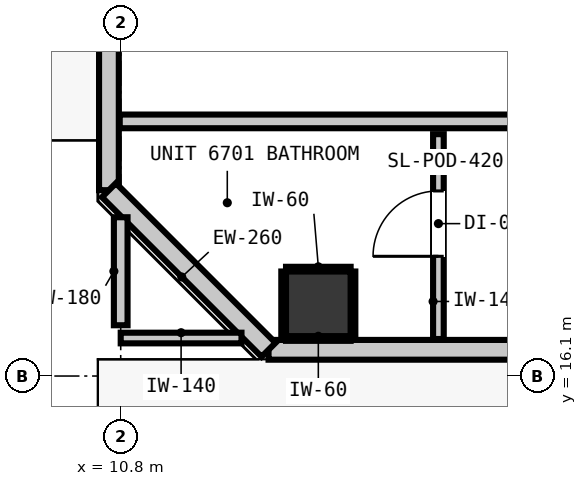
"""IFC4 building model, lengths in metres.
Left out: names, types, materials, properties, quantities, classifications, styles, units other than length and angle.
Written with IfcOpenShell. Run it as: python <this file> out.ifc"""

import sys

from ifc_helpers import new_model, si_unit, direction, frame, frame_2d, origin, origin_2d, place, context, subcontext, project, spatial, rectangle, extrude, element, fill, save


model = new_model("IFC4")
c1 = context("Model", 3, precision=1e-05, world=origin(), true_north=direction((0.0, 1.0)))
c2 = subcontext(c1, "Body", "Model", "MODEL_VIEW")
j1 = project(units=[si_unit("LENGTHUNIT", "METRE"), si_unit("PLANEANGLEUNIT", "RADIAN")], contexts=[c1])
p1 = place(None, origin())
s1 = spatial("IfcSite", under=j1, at=p1, CompositionType="ELEMENT")
p2 = place(p1, origin())
s2 = spatial("IfcBuilding", under=s1, at=p2, CompositionType="ELEMENT")
p3 = place(p2, frame((0.0, 0.0, 231.28)))
s3 = spatial("IfcBuildingStorey", under=s2, at=p3, CompositionType="ELEMENT", Elevation=231.28)
p4 = place(p3, frame((13.4, 17.05, -0.2), z_axis=(0.0, 0.0, 1.0), x_axis=(1.0, 0.0, 0.0)))
e1 = element("IfcColumn", 1, at=p4, inside=s3, PredefinedType="COLUMN", context=c2, shape_type="SweptSolid", body=[
    extrude(rectangle(XDim=0.85, YDim=0.85, at=origin_2d()), origin(), (0.0, 0.0, 1.0), 3.52),
])
p5 = place(p3, frame((10.645, 18.545, 0.0), z_axis=(0.0, 0.0, 1.0), x_axis=(0.0, 1.0, 0.0)))
e2 = element("IfcWall", 2, at=p5, inside=s3, PredefinedType="STANDARD", context=c2, shape_type="SweptSolid", body=[
    extrude(rectangle(XDim=30.31, YDim=0.26, at=frame_2d((15.155, 0.0))), origin(), (0.0, 0.0, 1.0), 3.1),
])
p6 = place(p5, frame((27.695, 0.0, 0.0)))
e3 = element("IfcOpeningElement", 3, at=p6, cuts=e2, PredefinedType="OPENING", context=c2, shape_type="SweptSolid", body=[
    extrude(rectangle(XDim=1.0, YDim=2.15, at=frame_2d((0.5, 1.075))), frame((0.0, 0.14, 0.0), z_axis=(0.0, -1.0, 0.0), x_axis=(1.0, 0.0, 0.0)), (0.0, 0.0, 1.0), 0.28),
])
p7 = place(p5, frame((29.108, 0.0, 0.85)))
e4 = element("IfcOpeningElement", 4, at=p7, cuts=e2, PredefinedType="OPENING", context=c2, shape_type="SweptSolid", body=[
    extrude(rectangle(XDim=0.9, YDim=1.5, at=frame_2d((0.45, 0.75))), frame((0.0, 0.14, 0.0), z_axis=(0.0, -1.0, 0.0), x_axis=(1.0, 0.0, 0.0)), (0.0, 0.0, 1.0), 0.28),
])
p8 = place(p3, frame((45.455, 16.445, 0.0), z_axis=(0.0, 0.0, 1.0), x_axis=(-1.0, 0.0, 0.0)))
e5 = element("IfcWall", 5, at=p8, inside=s3, PredefinedType="STANDARD", context=c2, shape_type="SweptSolid", body=[
    extrude(rectangle(XDim=32.71, YDim=0.26, at=frame_2d((16.355, 0.0))), origin(), (0.0, 0.0, 1.0), 3.1),
])
p9 = place(p8, frame((0.857, 0.0, 0.0)))
e6 = element("IfcOpeningElement", 6, at=p9, cuts=e5, PredefinedType="OPENING", context=c2, shape_type="SweptSolid", body=[
    extrude(rectangle(XDim=1.1, YDim=2.15, at=frame_2d((0.55, 1.075))), frame((0.0, 0.14, 0.0), z_axis=(0.0, -1.0, 0.0), x_axis=(1.0, 0.0, 0.0)), (0.0, 0.0, 1.0), 0.28),
])
p10 = place(p8, frame((26.377, 0.0, 0.85)))
e7 = element("IfcOpeningElement", 7, at=p10, cuts=e5, PredefinedType="OPENING", context=c2, shape_type="SweptSolid", body=[
    extrude(rectangle(XDim=2.7, YDim=2.0, at=frame_2d((1.35, 1.0))), frame((0.0, 0.14, 0.0), z_axis=(0.0, -1.0, 0.0), x_axis=(1.0, 0.0, 0.0)), (0.0, 0.0, 1.0), 0.28),
])
p11 = place(p8, frame((11.255, 0.0, 0.85)))
e8 = element("IfcOpeningElement", 8, at=p11, cuts=e5, PredefinedType="OPENING", context=c2, shape_type="SweptSolid", body=[
    extrude(rectangle(XDim=2.7, YDim=2.0, at=frame_2d((1.35, 1.0))), frame((0.0, 0.14, 0.0), z_axis=(0.0, -1.0, 0.0), x_axis=(1.0, 0.0, 0.0)), (0.0, 0.0, 1.0), 0.28),
])
p12 = place(p3, frame((12.745, 16.445, 0.0), z_axis=(0.0, 0.0, 1.0), x_axis=(-0.707147883682, 0.707065676302, 0.0)))
e9 = element("IfcWall", 9, at=p12, inside=s3, PredefinedType="STANDARD", context=c2, shape_type="SweptSolid", body=[
    extrude(rectangle(XDim=2.97, YDim=0.26, at=frame_2d((1.485, 0.0))), origin(), (0.0, 0.0, 1.0), 3.1),
])
p13 = place(p3, frame((10.787, 19.45, 0.0), z_axis=(0.0, 0.0, 1.0), x_axis=(1.0, 0.0, 0.0)))
e10 = element("IfcWall", 10, at=p13, inside=s3, PredefinedType="PARTITIONING", context=c2, shape_type="SweptSolid", body=[
    extrude(rectangle(XDim=26.102, YDim=0.18, at=frame_2d((13.051, 0.0))), origin(), (0.0, 0.0, 1.0), 3.1),
])
p14 = place(p13, frame((7.817, 0.0, 0.0)))
e11 = element("IfcOpeningElement", 11, at=p14, cuts=e10, PredefinedType="OPENING", context=c2, shape_type="SweptSolid", body=[
    extrude(rectangle(XDim=1.0, YDim=2.15, at=frame_2d((0.5, 1.075))), frame((0.0, 0.1, 0.0), z_axis=(0.0, -1.0, 0.0), x_axis=(1.0, 0.0, 0.0)), (0.0, 0.0, 1.0), 0.2),
])
p15 = place(p13, frame((24.992, 0.0, 0.0)))
e12 = element("IfcOpeningElement", 12, at=p15, cuts=e10, PredefinedType="OPENING", context=c2, shape_type="SweptSolid", body=[
    extrude(rectangle(XDim=1.0, YDim=2.15, at=frame_2d((0.5, 1.075))), frame((0.0, 0.1, 0.0), z_axis=(0.0, -1.0, 0.0), x_axis=(1.0, 0.0, 0.0)), (0.0, 0.0, 1.0), 0.2),
])
p16 = place(p3, frame((10.8, 16.6, 0.0), z_axis=(0.0, 0.0, 1.0), x_axis=(1.0, 0.0, 0.0)))
e13 = element("IfcWall", 13, at=p16, inside=s3, PredefinedType="PARTITIONING", context=c2, shape_type="SweptSolid", body=[
    extrude(rectangle(XDim=1.589, YDim=0.14, at=frame_2d((0.794, 0.0))), origin(), (0.0, 0.0, 1.0), 3.1),
])
p17 = place(p3, frame((10.8, 16.768, 0.0), z_axis=(0.0, 0.0, 1.0), x_axis=(0.0, 1.0, 0.0)))
e14 = element("IfcWall", 14, at=p17, inside=s3, PredefinedType="PARTITIONING", context=c2, shape_type="SweptSolid", body=[
    extrude(rectangle(XDim=1.421, YDim=0.18, at=frame_2d((0.71, 0.0))), origin(), (0.0, 0.0, 1.0), 3.1),
])
p18 = place(p3, frame((14.98, 16.587, 0.0), z_axis=(0.0, 0.0, 1.0), x_axis=(0.0, 1.0, 0.0)))
e15 = element("IfcWall", 15, at=p18, inside=s3, PredefinedType="PARTITIONING", context=c2, shape_type="SweptSolid", body=[
    extrude(rectangle(XDim=2.695, YDim=0.14, at=frame_2d((1.348, 0.0))), origin(), (0.0, 0.0, 1.0), 3.1),
])
p19 = place(p18, frame((1.088, 0.0, 0.0)))
e16 = element("IfcOpeningElement", 16, at=p19, cuts=e15, PredefinedType="OPENING", context=c2, shape_type="SweptSolid", body=[
    extrude(rectangle(XDim=0.86, YDim=2.02, at=frame_2d((0.43, 1.01))), frame((0.0, 0.08, 0.0), z_axis=(0.0, -1.0, 0.0), x_axis=(1.0, 0.0, 0.0)), (0.0, 0.0, 1.0), 0.16),
])
for number, where, z_axis, x_axis in (
    (17, (12.975, 16.593, 0.0), (0.0, 0.0, 1.0), (1.0, 0.0, 0.0)),
    (18, (12.975, 17.507, 0.0), (0.0, 0.0, 1.0), (1.0, 0.0, 0.0)),
):
    element("IfcWall", number, at=place(p3, frame(where, z_axis=z_axis, x_axis=x_axis)), inside=s3, PredefinedType="PARTITIONING", context=c2, shape_type="SweptSolid", body=[
        extrude(rectangle(XDim=0.85, YDim=0.06, at=frame_2d((0.425, 0.0))), origin(), (0.0, 0.0, 1.0), 1.45),
    ])
for number, where, z_axis, x_axis in (
    (19, (12.943, 16.625, 0.0), (0.0, 0.0, 1.0), (0.0, 1.0, 0.0)),
    (20, (13.857, 16.625, 0.0), (0.0, 0.0, 1.0), (0.0, 1.0, 0.0)),
):
    element("IfcWall", number, at=place(p3, frame(where, z_axis=z_axis, x_axis=x_axis)), inside=s3, PredefinedType="PARTITIONING", context=c2, shape_type="SweptSolid", body=[
        extrude(rectangle(XDim=0.85, YDim=0.06, at=frame_2d((0.425, 0.0))), origin(), (0.0, 0.0, 1.0), 1.45),
    ])
p20 = place(p19, origin())
e21 = element("IfcDoor", 21, at=p20, inside=s3, OperationType="SINGLE_SWING_LEFT", PredefinedType="DOOR", context=c2, shape_type="SweptSolid", body=[
    extrude(rectangle(XDim=0.86, YDim=2.02, at=frame_2d((0.43, 1.01))), frame((0.0, 0.025, 0.0), z_axis=(0.0, -1.0, 0.0), x_axis=(1.0, 0.0, 0.0)), (0.0, 0.0, 1.0), 0.05),
])
fill(e16, e21)
save(model, sys.argv[1])
